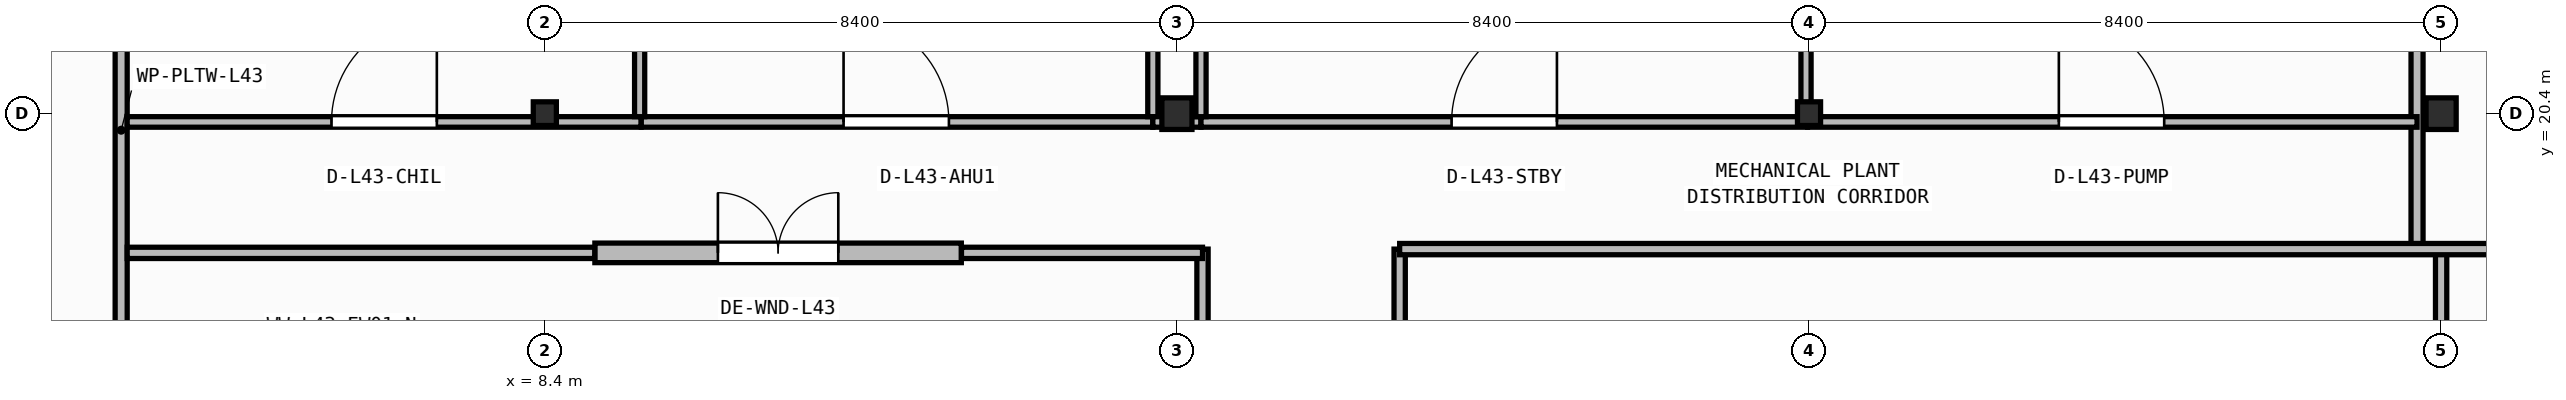
"""IFC4 building model, lengths in metres.
Left out: names, types, materials, properties, quantities, classifications, styles, units other than length and angle.
Written with IfcOpenShell. Run it as: python <this file> out.ifc"""

import sys

from ifc_helpers import new_model, si_unit, direction, frame, frame_2d, origin, origin_2d, place, context, subcontext, project, spatial, rectangle, i_section, extrude, element, fill, save


model = new_model("IFC4")
c1 = context("Model", 3, precision=1e-05, world=origin(), true_north=direction((0.0, 1.0)))
c2 = subcontext(c1, "Body", "Model", "MODEL_VIEW")
j1 = project(units=[si_unit("LENGTHUNIT", "METRE"), si_unit("PLANEANGLEUNIT", "RADIAN")], contexts=[c1])
p1 = place(None, origin())
s1 = spatial("IfcSite", under=j1, at=p1, CompositionType="ELEMENT")
p2 = place(p1, origin())
s2 = spatial("IfcBuilding", under=s1, at=p2, CompositionType="ELEMENT")
p3 = place(p2, frame((0.0, 0.0, 174.45)))
s3 = spatial("IfcBuildingStorey", under=s2, at=p3, CompositionType="ELEMENT", Elevation=174.45)
p4 = place(p3, frame((8.4, 20.4, 0.0), z_axis=(0.0, 0.0, 1.0), x_axis=(1.0, 0.0, 0.0)))
e1 = element("IfcColumn", 1, at=p4, inside=s3, PredefinedType="COLUMN", context=c2, shape_type="SweptSolid", body=[
    extrude(i_section(OverallWidth=0.307, OverallDepth=0.315, WebThickness=0.012, FlangeThickness=0.019, FilletRadius=0.017, at=origin_2d()), origin(), (0.0, 0.0, 1.0), 5.8),
])
p5 = place(p3, frame((16.8, 20.4, 0.0), z_axis=(0.0, 0.0, 1.0), x_axis=(1.0, 0.0, 0.0)))
e2 = element("IfcColumn", 2, at=p5, inside=s3, PredefinedType="COLUMN", context=c2, shape_type="SweptSolid", body=[
    extrude(i_section(OverallWidth=0.4, OverallDepth=0.42, WebThickness=0.025, FlangeThickness=0.04, at=origin_2d()), origin(), (0.0, 0.0, 1.0), 5.8),
])
p6 = place(p3, frame((25.2, 20.4, 0.0), z_axis=(0.0, 0.0, 1.0), x_axis=(1.0, 0.0, 0.0)))
e3 = element("IfcColumn", 3, at=p6, inside=s3, PredefinedType="COLUMN", context=c2, shape_type="SweptSolid", body=[
    extrude(i_section(OverallWidth=0.307, OverallDepth=0.315, WebThickness=0.012, FlangeThickness=0.019, FilletRadius=0.017, at=origin_2d()), origin(), (0.0, 0.0, 1.0), 5.8),
])
p7 = place(p3, frame((33.6, 20.4, 0.0), z_axis=(0.0, 0.0, 1.0), x_axis=(1.0, 0.0, 0.0)))
e4 = element("IfcColumn", 4, at=p7, inside=s3, PredefinedType="COLUMN", context=c2, shape_type="SweptSolid", body=[
    extrude(i_section(OverallWidth=0.4, OverallDepth=0.42, WebThickness=0.025, FlangeThickness=0.04, at=origin_2d()), origin(), (0.0, 0.0, 1.0), 5.8),
])
p8 = place(p3, frame((9.065, 18.55, 0.0), z_axis=(0.0, 0.0, 1.0), x_axis=(1.0, 0.0, 0.0)))
e5 = element("IfcWall", 5, at=p8, inside=s3, PredefinedType="STANDARD", context=c2, shape_type="SweptSolid", body=[
    extrude(rectangle(XDim=4.87, YDim=0.26, at=frame_2d((2.435, 0.0))), origin(), (0.0, 0.0, 1.0), 5.56),
])
p9 = place(p8, frame((1.635, 0.0, 0.0)))
e6 = element("IfcOpeningElement", 6, at=p9, cuts=e5, PredefinedType="OPENING", context=c2, shape_type="SweptSolid", body=[
    extrude(rectangle(XDim=1.6, YDim=2.2, at=frame_2d((0.8, 1.1))), frame((0.0, 0.14, 0.0), z_axis=(0.0, -1.0, 0.0), x_axis=(1.0, 0.0, 0.0)), (0.0, 0.0, 1.0), 0.28),
])
p10 = place(p3, frame((2.77, 12.16, 0.0), z_axis=(0.0, 0.0, 1.0), x_axis=(0.0, 1.0, 0.0)))
e7 = element("IfcWall", 7, at=p10, inside=s3, PredefinedType="PARTITIONING", context=c2, shape_type="SweptSolid", body=[
    extrude(rectangle(XDim=16.04, YDim=0.16, at=frame_2d((8.02, 0.0))), origin(), (0.0, 0.0, 1.0), 5.56),
])
p11 = place(p3, frame((33.28, 18.6, 0.0), z_axis=(0.0, 0.0, 1.0), x_axis=(0.0, 1.0, 0.0)))
e8 = element("IfcWall", 8, at=p11, inside=s3, PredefinedType="PARTITIONING", context=c2, shape_type="SweptSolid", body=[
    extrude(rectangle(XDim=9.6, YDim=0.16, at=frame_2d((4.8, 0.0))), origin(), (0.0, 0.0, 1.0), 4.325),
])
p12 = place(p3, frame((17.14, 14.81, 0.0), z_axis=(0.0, 0.0, 1.0), x_axis=(0.0, 1.0, 0.0)))
e9 = element("IfcWall", 9, at=p12, inside=s3, PredefinedType="PARTITIONING", context=c2, shape_type="SweptSolid", body=[
    extrude(rectangle(XDim=3.79, YDim=0.15, at=frame_2d((1.895, 0.0))), origin(), (0.0, 0.0, 1.0), 5.56),
])
p13 = place(p3, frame((2.85, 18.55, 0.0), z_axis=(0.0, 0.0, 1.0), x_axis=(1.0, 0.0, 0.0)))
e10 = element("IfcWall", 10, at=p13, inside=s3, PredefinedType="PARTITIONING", context=c2, shape_type="SweptSolid", body=[
    extrude(rectangle(XDim=6.213, YDim=0.15, at=frame_2d((3.106, 0.0))), origin(), (0.0, 0.0, 1.0), 5.56),
])
p14 = place(p3, frame((13.937, 18.55, 0.0), z_axis=(0.0, 0.0, 1.0), x_axis=(1.0, 0.0, 0.0)))
e11 = element("IfcWall", 11, at=p14, inside=s3, PredefinedType="PARTITIONING", context=c2, shape_type="SweptSolid", body=[
    extrude(rectangle(XDim=3.203, YDim=0.15, at=frame_2d((1.602, 0.0))), origin(), (0.0, 0.0, 1.0), 5.56),
])
p15 = place(p3, frame((19.76, 14.81, 0.0), z_axis=(0.0, 0.0, 1.0), x_axis=(0.0, 1.0, 0.0)))
e12 = element("IfcWall", 12, at=p15, inside=s3, PredefinedType="PARTITIONING", context=c2, shape_type="SweptSolid", body=[
    extrude(rectangle(XDim=3.79, YDim=0.15, at=frame_2d((1.895, 0.0))), origin(), (0.0, 0.0, 1.0), 5.56),
])
p16 = place(p3, frame((33.6, 14.81, 0.0), z_axis=(0.0, 0.0, 1.0), x_axis=(0.0, 1.0, 0.0)))
e13 = element("IfcWall", 13, at=p16, inside=s3, PredefinedType="PARTITIONING", context=c2, shape_type="SweptSolid", body=[
    extrude(rectangle(XDim=3.79, YDim=0.15, at=frame_2d((1.895, 0.0))), origin(), (0.0, 0.0, 1.0), 4.325),
])
p17 = place(p3, frame((19.76, 18.6, 0.0), z_axis=(0.0, 0.0, 1.0), x_axis=(1.0, 0.0, 0.0)))
e14 = element("IfcWall", 14, at=p17, inside=s3, PredefinedType="PARTITIONING", context=c2, shape_type="SweptSolid", body=[
    extrude(rectangle(XDim=28.64, YDim=0.15, at=frame_2d((14.32, 0.0))), origin(), (0.0, 0.0, 1.0), 5.56),
])
p18 = place(p3, frame((2.85, 20.29, 0.0), z_axis=(0.0, 0.0, 1.0), x_axis=(1.0, 0.0, 0.0)))
e15 = element("IfcWall", 15, at=p18, inside=s3, PredefinedType="PARTITIONING", context=c2, shape_type="SweptSolid", body=[
    extrude(rectangle(XDim=6.83, YDim=0.14, at=frame_2d((3.415, 0.0))), origin(), (0.0, 0.0, 1.0), 4.835),
])
p19 = place(p18, frame((2.715, 0.0, 0.0)))
e16 = element("IfcOpeningElement", 16, at=p19, cuts=e15, PredefinedType="OPENING", context=c2, shape_type="SweptSolid", body=[
    extrude(rectangle(XDim=1.4, YDim=2.15, at=frame_2d((0.7, 1.075))), frame((0.0, 0.08, 0.0), z_axis=(0.0, -1.0, 0.0), x_axis=(1.0, 0.0, 0.0)), (0.0, 0.0, 1.0), 0.16),
])
p20 = place(p3, frame((9.682, 20.29, 0.0), z_axis=(0.0, 0.0, 1.0), x_axis=(1.0, 0.0, 0.0)))
e17 = element("IfcWall", 17, at=p20, inside=s3, PredefinedType="PARTITIONING", context=c2, shape_type="SweptSolid", body=[
    extrude(rectangle(XDim=6.798, YDim=0.14, at=frame_2d((3.399, 0.0))), origin(), (0.0, 0.0, 1.0), 4.835),
])
p21 = place(p20, frame((2.688, 0.0, 0.0)))
e18 = element("IfcOpeningElement", 18, at=p21, cuts=e17, PredefinedType="OPENING", context=c2, shape_type="SweptSolid", body=[
    extrude(rectangle(XDim=1.4, YDim=2.15, at=frame_2d((0.7, 1.075))), frame((0.0, 0.08, 0.0), z_axis=(0.0, -1.0, 0.0), x_axis=(1.0, 0.0, 0.0)), (0.0, 0.0, 1.0), 0.16),
])
p22 = place(p3, frame((9.66, 20.36, 0.0), z_axis=(0.0, 0.0, 1.0), x_axis=(0.0, 1.0, 0.0)))
e19 = element("IfcWall", 19, at=p22, inside=s3, PredefinedType="PARTITIONING", context=c2, shape_type="SweptSolid", body=[
    extrude(rectangle(XDim=7.84, YDim=0.135, at=frame_2d((3.92, 0.0))), origin(), (0.0, 0.0, 1.0), 5.56),
])
p23 = place(p3, frame((16.48, 20.36, 0.0), z_axis=(0.0, 0.0, 1.0), x_axis=(0.0, 1.0, 0.0)))
e20 = element("IfcWall", 20, at=p23, inside=s3, PredefinedType="PARTITIONING", context=c2, shape_type="SweptSolid", body=[
    extrude(rectangle(XDim=7.84, YDim=0.135, at=frame_2d((3.92, 0.0))), origin(), (0.0, 0.0, 1.0), 4.325),
])
p24 = place(p3, frame((16.48, 20.29, 0.0), z_axis=(0.0, 0.0, 1.0), x_axis=(1.0, 0.0, 0.0)))
e21 = element("IfcWall", 21, at=p24, inside=s3, PredefinedType="PARTITIONING", context=c2, shape_type="SweptSolid", body=[
    extrude(rectangle(XDim=0.64, YDim=0.14, at=frame_2d((0.32, 0.0))), origin(), (0.0, 0.0, 1.0), 4.835),
])
p25 = place(p3, frame((17.12, 20.29, 0.0), z_axis=(0.0, 0.0, 1.0), x_axis=(1.0, 0.0, 0.0)))
e22 = element("IfcWall", 22, at=p25, inside=s3, PredefinedType="PARTITIONING", context=c2, shape_type="SweptSolid", body=[
    extrude(rectangle(XDim=8.06, YDim=0.14, at=frame_2d((4.03, 0.0))), origin(), (0.0, 0.0, 1.0), 4.835),
])
p26 = place(p25, frame((3.33, 0.0, 0.0)))
e23 = element("IfcOpeningElement", 23, at=p26, cuts=e22, PredefinedType="OPENING", context=c2, shape_type="SweptSolid", body=[
    extrude(rectangle(XDim=1.4, YDim=2.15, at=frame_2d((0.7, 1.075))), frame((0.0, 0.08, 0.0), z_axis=(0.0, -1.0, 0.0), x_axis=(1.0, 0.0, 0.0)), (0.0, 0.0, 1.0), 0.16),
])
p27 = place(p3, frame((17.12, 20.36, 0.0), z_axis=(0.0, 0.0, 1.0), x_axis=(0.0, 1.0, 0.0)))
e24 = element("IfcWall", 24, at=p27, inside=s3, PredefinedType="PARTITIONING", context=c2, shape_type="SweptSolid", body=[
    extrude(rectangle(XDim=7.84, YDim=0.135, at=frame_2d((3.92, 0.0))), origin(), (0.0, 0.0, 1.0), 4.325),
])
p28 = place(p3, frame((25.182, 20.29, 0.0), z_axis=(0.0, 0.0, 1.0), x_axis=(1.0, 0.0, 0.0)))
e25 = element("IfcWall", 25, at=p28, inside=s3, PredefinedType="PARTITIONING", context=c2, shape_type="SweptSolid", body=[
    extrude(rectangle(XDim=8.098, YDim=0.14, at=frame_2d((4.049, 0.0))), origin(), (0.0, 0.0, 1.0), 4.835),
])
p29 = place(p28, frame((3.338, 0.0, 0.0)))
e26 = element("IfcOpeningElement", 26, at=p29, cuts=e25, PredefinedType="OPENING", context=c2, shape_type="SweptSolid", body=[
    extrude(rectangle(XDim=1.4, YDim=2.15, at=frame_2d((0.7, 1.075))), frame((0.0, 0.08, 0.0), z_axis=(0.0, -1.0, 0.0), x_axis=(1.0, 0.0, 0.0)), (0.0, 0.0, 1.0), 0.16),
])
p30 = place(p3, frame((25.16, 20.36, 0.0), z_axis=(0.0, 0.0, 1.0), x_axis=(0.0, 1.0, 0.0)))
e27 = element("IfcWall", 27, at=p30, inside=s3, PredefinedType="PARTITIONING", context=c2, shape_type="SweptSolid", body=[
    extrude(rectangle(XDim=7.84, YDim=0.135, at=frame_2d((3.92, 0.0))), origin(), (0.0, 0.0, 1.0), 4.325),
])
p31 = place(p9, origin())
e28 = element("IfcDoor", 28, at=p31, inside=s3, OperationType="DOUBLE_DOOR_SINGLE_SWING", PredefinedType="DOOR", context=c2, shape_type="SweptSolid", body=[
    extrude(rectangle(XDim=1.6, YDim=2.2, at=frame_2d((0.8, 1.1))), frame((0.0, 0.025, 0.0), z_axis=(0.0, -1.0, 0.0), x_axis=(1.0, 0.0, 0.0)), (0.0, 0.0, 1.0), 0.05),
])
fill(e6, e28)
p32 = place(p19, origin())
e29 = element("IfcDoor", 29, at=p32, inside=s3, OperationType="SINGLE_SWING_RIGHT", PredefinedType="DOOR", context=c2, shape_type="SweptSolid", body=[
    extrude(rectangle(XDim=1.4, YDim=2.15, at=frame_2d((0.7, 1.075))), frame((0.0, 0.025, 0.0), z_axis=(0.0, -1.0, 0.0), x_axis=(1.0, 0.0, 0.0)), (0.0, 0.0, 1.0), 0.05),
])
fill(e16, e29)
p33 = place(p21, origin())
e30 = element("IfcDoor", 30, at=p33, inside=s3, OperationType="SINGLE_SWING_LEFT", PredefinedType="DOOR", context=c2, shape_type="SweptSolid", body=[
    extrude(rectangle(XDim=1.4, YDim=2.15, at=frame_2d((0.7, 1.075))), frame((0.0, 0.025, 0.0), z_axis=(0.0, -1.0, 0.0), x_axis=(1.0, 0.0, 0.0)), (0.0, 0.0, 1.0), 0.05),
])
fill(e18, e30)
p34 = place(p26, origin())
e31 = element("IfcDoor", 31, at=p34, inside=s3, OperationType="SINGLE_SWING_RIGHT", PredefinedType="DOOR", context=c2, shape_type="SweptSolid", body=[
    extrude(rectangle(XDim=1.4, YDim=2.15, at=frame_2d((0.7, 1.075))), frame((0.0, 0.025, 0.0), z_axis=(0.0, -1.0, 0.0), x_axis=(1.0, 0.0, 0.0)), (0.0, 0.0, 1.0), 0.05),
])
fill(e23, e31)
p35 = place(p29, origin())
e32 = element("IfcDoor", 32, at=p35, inside=s3, OperationType="SINGLE_SWING_LEFT", PredefinedType="DOOR", context=c2, shape_type="SweptSolid", body=[
    extrude(rectangle(XDim=1.4, YDim=2.15, at=frame_2d((0.7, 1.075))), frame((0.0, 0.025, 0.0), z_axis=(0.0, -1.0, 0.0), x_axis=(1.0, 0.0, 0.0)), (0.0, 0.0, 1.0), 0.05),
])
fill(e26, e32)
save(model, sys.argv[1])
